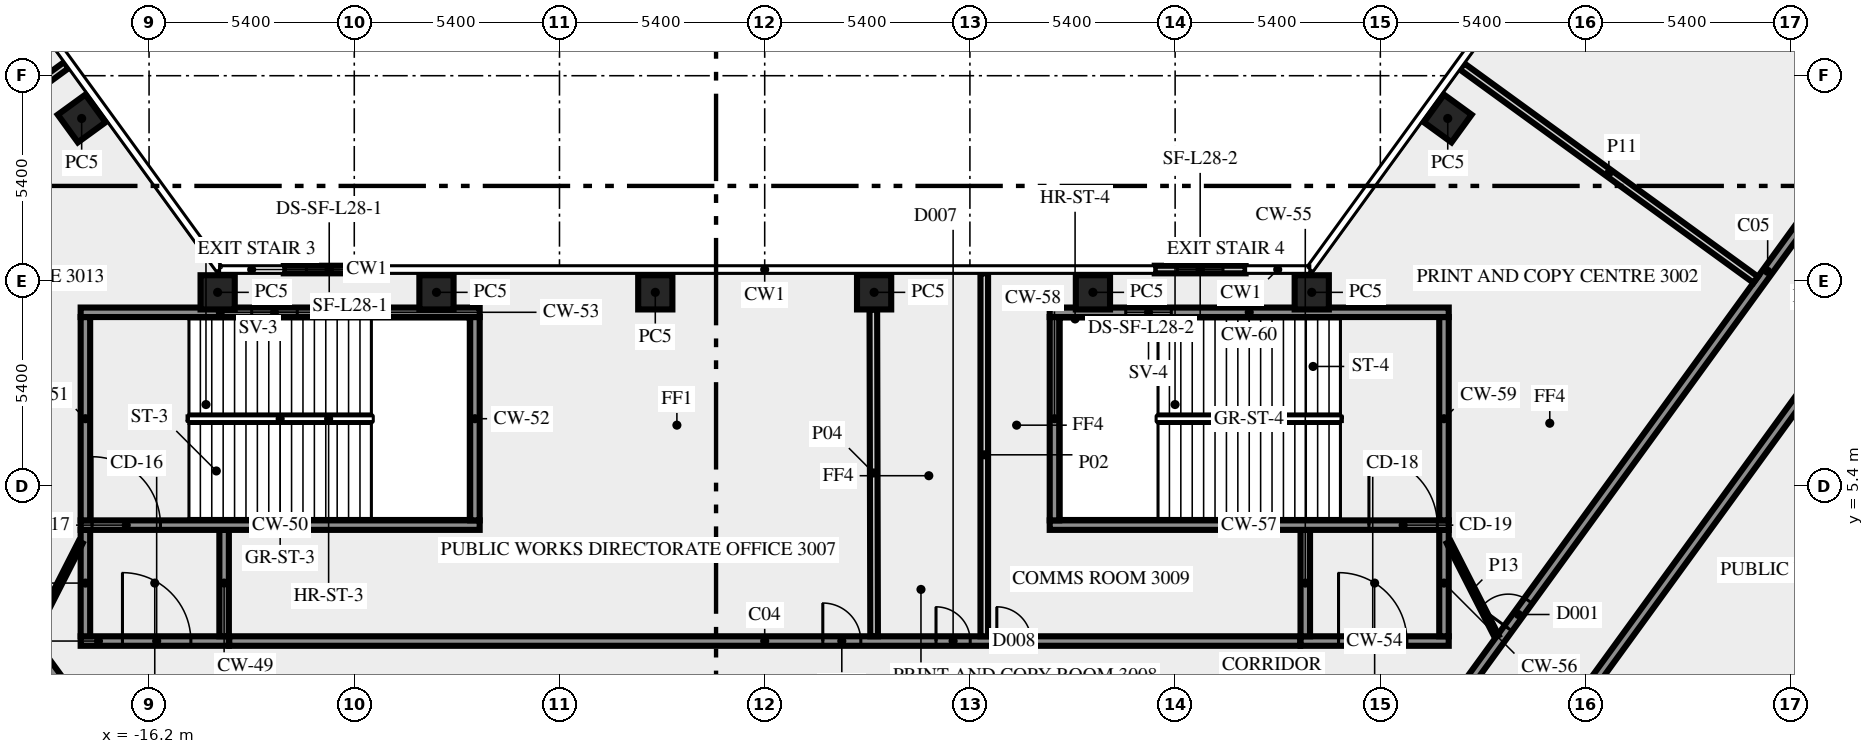
"""IFC4 building model, lengths in metres.
Left out: names, types, materials, properties, quantities, classifications, styles, units other than length and angle.
Written with IfcOpenShell. Run it as: python <this file> out.ifc"""

import sys

from ifc_helpers import new_model, si_unit, direction, frame, frame_2d, origin, origin_2d, place, context, subcontext, project, spatial, rectangle, extrude, element, fill, save


model = new_model("IFC4")
c1 = context("Model", 3, precision=1e-05, world=origin(), true_north=direction((0.0, 1.0)))
c2 = subcontext(c1, "Body", "Model", "MODEL_VIEW")
j1 = project(units=[si_unit("LENGTHUNIT", "METRE"), si_unit("PLANEANGLEUNIT", "RADIAN")], contexts=[c1])
p1 = place(None, origin())
s1 = spatial("IfcSite", under=j1, at=p1, CompositionType="ELEMENT")
p2 = place(p1, origin())
s2 = spatial("IfcBuilding", under=s1, at=p2, CompositionType="ELEMENT")
p3 = place(p2, frame((0.0, 0.0, 129.0)))
s3 = spatial("IfcBuildingStorey", under=s2, at=p3, CompositionType="ELEMENT", Elevation=129.0)
for number, where, z_axis, x_axis in (
    (1, (-17.974, 15.075, 0.0), (0.0, 0.0, 1.0), (-0.588, 0.809, 0.0)),
    (2, (17.974, 15.075, 0.0), (0.0, 0.0, 1.0), (-0.588, -0.809, 0.0)),
    (3, (14.395, 10.5, 0.0), (0.0, 0.0, 1.0), (-1.0, 0.0, 0.0)),
    (4, (8.637, 10.5, 0.0), (0.0, 0.0, 1.0), (-1.0, 0.0, 0.0)),
    (5, (2.879, 10.5, 0.0), (0.0, 0.0, 1.0), (-1.0, 0.0, 0.0)),
    (6, (-2.879, 10.5, 0.0), (0.0, 0.0, 1.0), (-1.0, 0.0, 0.0)),
    (7, (-8.637, 10.5, 0.0), (0.0, 0.0, 1.0), (-1.0, 0.0, 0.0)),
    (8, (-14.395, 10.5, 0.0), (0.0, 0.0, 1.0), (-1.0, 0.0, 0.0)),
):
    element("IfcColumn", number, at=place(p3, frame(where, z_axis=z_axis, x_axis=x_axis)), inside=s3, PredefinedType="COLUMN", context=c2, shape_type="SweptSolid", body=[
        extrude(rectangle(XDim=0.9, YDim=0.9, at=origin_2d()), origin(), (0.0, 0.0, 1.0), 3.4),
    ])
p4 = place(p3, frame((12.655, 11.1, 0.0), z_axis=(0.0, 0.0, 1.0), x_axis=(-1.0, 0.0, 0.0)))
e9 = element("IfcWall", 9, at=p4, inside=s3, PredefinedType="SOLIDWALL", context=c2, shape_type="SweptSolid", body=[
    extrude(rectangle(XDim=2.392, YDim=0.2, at=frame_2d((1.196, 0.0))), origin(), (0.0, 0.0, 1.0), 3.4),
])
p5 = place(p4, frame((0.596, 0.0, 1.0)))
e10 = element("IfcOpeningElement", 10, at=p5, cuts=e9, PredefinedType="OPENING", context=c2, shape_type="SweptSolid", body=[
    extrude(rectangle(XDim=1.2, YDim=1.2, at=frame_2d((0.6, 0.6))), frame((0.0, 0.11, 0.0), z_axis=(0.0, -1.0, 0.0), x_axis=(1.0, 0.0, 0.0)), (0.0, 0.0, 1.0), 0.22),
])
p6 = place(p3, frame((-10.263, 11.1, 0.0), z_axis=(0.0, 0.0, 1.0), x_axis=(-1.0, 0.0, 0.0)))
e11 = element("IfcWall", 11, at=p6, inside=s3, PredefinedType="SOLIDWALL", context=c2, shape_type="SweptSolid", body=[
    extrude(rectangle(XDim=2.392, YDim=0.2, at=frame_2d((1.196, 0.0))), origin(), (0.0, 0.0, 1.0), 3.4),
])
p7 = place(p6, frame((0.596, 0.0, 1.0)))
e12 = element("IfcOpeningElement", 12, at=p7, cuts=e11, PredefinedType="OPENING", context=c2, shape_type="SweptSolid", body=[
    extrude(rectangle(XDim=1.2, YDim=1.2, at=frame_2d((0.6, 0.6))), frame((0.0, 0.11, 0.0), z_axis=(0.0, -1.0, 0.0), x_axis=(1.0, 0.0, 0.0)), (0.0, 0.0, 1.0), 0.22),
])
p8 = place(p3, frame((-18.0, 1.325, 0.0), z_axis=(0.0, 0.0, 1.0), x_axis=(1.0, 0.0, 0.0)))
e13 = element("IfcWall", 13, at=p8, inside=s3, PredefinedType="SHEAR", context=c2, shape_type="SweptSolid", body=[
    extrude(rectangle(XDim=3.9, YDim=0.25, at=frame_2d((1.95, 0.0))), origin(), (0.0, 0.0, 1.0), 3.4),
])
p9 = place(p8, frame((1.1, 0.0, 0.0)))
e14 = element("IfcOpeningElement", 14, at=p9, cuts=e13, PredefinedType="OPENING", context=c2, shape_type="SweptSolid", body=[
    extrude(rectangle(XDim=1.8, YDim=2.1, at=frame_2d((0.9, 1.05))), frame((0.0, 0.135, 0.0), z_axis=(0.0, -1.0, 0.0), x_axis=(1.0, 0.0, 0.0)), (0.0, 0.0, 1.0), 0.27),
])
for number, where, z_axis, x_axis in (
    (15, (-17.875, 1.45, 0.0), (0.0, 0.0, 1.0), (0.0, 1.0, 0.0)),
    (16, (-14.225, 1.45, 0.0), (0.0, 0.0, 1.0), (0.0, 1.0, 0.0)),
):
    element("IfcWall", number, at=place(p3, frame(where, z_axis=z_axis, x_axis=x_axis)), inside=s3, PredefinedType="SHEAR", context=c2, shape_type="SweptSolid", body=[
        extrude(rectangle(XDim=2.8, YDim=0.25, at=frame_2d((1.4, 0.0))), origin(), (0.0, 0.0, 1.0), 3.4),
    ])
p10 = place(p3, frame((-18.0, 4.375, 0.0), z_axis=(0.0, 0.0, 1.0), x_axis=(1.0, 0.0, 0.0)))
e17 = element("IfcWall", 17, at=p10, inside=s3, PredefinedType="SHEAR", context=c2, shape_type="SweptSolid", body=[
    extrude(rectangle(XDim=10.5, YDim=0.25, at=frame_2d((5.25, 0.0))), origin(), (0.0, 0.0, 1.0), 3.4),
])
p11 = place(p10, frame((0.3, 0.0, 0.0)))
e18 = element("IfcOpeningElement", 18, at=p11, cuts=e17, PredefinedType="OPENING", context=c2, shape_type="SweptSolid", body=[
    extrude(rectangle(XDim=1.8, YDim=2.1, at=frame_2d((0.9, 1.05))), frame((0.0, 0.135, 0.0), z_axis=(0.0, -1.0, 0.0), x_axis=(1.0, 0.0, 0.0)), (0.0, 0.0, 1.0), 0.27),
])
for number, where, z_axis, x_axis in (
    (19, (-17.875, 4.5, 0.0), (0.0, 0.0, 1.0), (0.0, 1.0, 0.0)),
    (20, (-7.625, 4.5, 0.0), (0.0, 0.0, 1.0), (0.0, 1.0, 0.0)),
):
    element("IfcWall", number, at=place(p3, frame(where, z_axis=z_axis, x_axis=x_axis)), inside=s3, PredefinedType="SHEAR", context=c2, shape_type="SweptSolid", body=[
        extrude(rectangle(XDim=5.35, YDim=0.25, at=frame_2d((2.675, 0.0))), origin(), (0.0, 0.0, 1.0), 3.4),
    ])
p12 = place(p3, frame((-18.0, 9.975, 0.0), z_axis=(0.0, 0.0, 1.0), x_axis=(1.0, 0.0, 0.0)))
e21 = element("IfcWall", 21, at=p12, inside=s3, PredefinedType="SHEAR", context=c2, shape_type="SweptSolid", body=[
    extrude(rectangle(XDim=10.5, YDim=0.25, at=frame_2d((5.25, 0.0))), origin(), (0.0, 0.0, 1.0), 3.4),
])
p13 = place(p12, frame((4.5, 0.0, 1.0)))
e22 = element("IfcOpeningElement", 22, at=p13, cuts=e21, PredefinedType="OPENING", context=c2, shape_type="SweptSolid", body=[
    extrude(rectangle(XDim=1.2, YDim=1.2, at=frame_2d((0.6, 0.6))), frame((0.0, 0.135, 0.0), z_axis=(0.0, -1.0, 0.0), x_axis=(1.0, 0.0, 0.0)), (0.0, 0.0, 1.0), 0.27),
])
p14 = place(p3, frame((14.1, 1.325, 0.0), z_axis=(0.0, 0.0, 1.0), x_axis=(1.0, 0.0, 0.0)))
e23 = element("IfcWall", 23, at=p14, inside=s3, PredefinedType="SHEAR", context=c2, shape_type="SweptSolid", body=[
    extrude(rectangle(XDim=3.9, YDim=0.25, at=frame_2d((1.95, 0.0))), origin(), (0.0, 0.0, 1.0), 3.4),
])
p15 = place(p14, frame((1.0, 0.0, 0.0)))
e24 = element("IfcOpeningElement", 24, at=p15, cuts=e23, PredefinedType="OPENING", context=c2, shape_type="SweptSolid", body=[
    extrude(rectangle(XDim=1.8, YDim=2.1, at=frame_2d((0.9, 1.05))), frame((0.0, 0.135, 0.0), z_axis=(0.0, -1.0, 0.0), x_axis=(1.0, 0.0, 0.0)), (0.0, 0.0, 1.0), 0.27),
])
for number, where, z_axis, x_axis in (
    (25, (14.225, 1.45, 0.0), (0.0, 0.0, 1.0), (0.0, 1.0, 0.0)),
    (26, (17.875, 1.45, 0.0), (0.0, 0.0, 1.0), (0.0, 1.0, 0.0)),
):
    element("IfcWall", number, at=place(p3, frame(where, z_axis=z_axis, x_axis=x_axis)), inside=s3, PredefinedType="SHEAR", context=c2, shape_type="SweptSolid", body=[
        extrude(rectangle(XDim=2.8, YDim=0.25, at=frame_2d((1.4, 0.0))), origin(), (0.0, 0.0, 1.0), 3.4),
    ])
p16 = place(p3, frame((7.5, 4.375, 0.0), z_axis=(0.0, 0.0, 1.0), x_axis=(1.0, 0.0, 0.0)))
e27 = element("IfcWall", 27, at=p16, inside=s3, PredefinedType="SHEAR", context=c2, shape_type="SweptSolid", body=[
    extrude(rectangle(XDim=10.5, YDim=0.25, at=frame_2d((5.25, 0.0))), origin(), (0.0, 0.0, 1.0), 3.4),
])
p17 = place(p16, frame((8.4, 0.0, 0.0)))
e28 = element("IfcOpeningElement", 28, at=p17, cuts=e27, PredefinedType="OPENING", context=c2, shape_type="SweptSolid", body=[
    extrude(rectangle(XDim=1.8, YDim=2.1, at=frame_2d((0.9, 1.05))), frame((0.0, 0.135, 0.0), z_axis=(0.0, -1.0, 0.0), x_axis=(1.0, 0.0, 0.0)), (0.0, 0.0, 1.0), 0.27),
])
for number, where, z_axis, x_axis in (
    (29, (7.625, 4.5, 0.0), (0.0, 0.0, 1.0), (0.0, 1.0, 0.0)),
    (30, (17.875, 4.5, 0.0), (0.0, 0.0, 1.0), (0.0, 1.0, 0.0)),
):
    element("IfcWall", number, at=place(p3, frame(where, z_axis=z_axis, x_axis=x_axis)), inside=s3, PredefinedType="SHEAR", context=c2, shape_type="SweptSolid", body=[
        extrude(rectangle(XDim=5.35, YDim=0.25, at=frame_2d((2.675, 0.0))), origin(), (0.0, 0.0, 1.0), 3.4),
    ])
p18 = place(p3, frame((7.5, 9.975, 0.0), z_axis=(0.0, 0.0, 1.0), x_axis=(1.0, 0.0, 0.0)))
e31 = element("IfcWall", 31, at=p18, inside=s3, PredefinedType="SHEAR", context=c2, shape_type="SweptSolid", body=[
    extrude(rectangle(XDim=10.5, YDim=0.25, at=frame_2d((5.25, 0.0))), origin(), (0.0, 0.0, 1.0), 3.4),
])
p19 = place(p18, frame((2.0, 0.0, 1.0)))
e32 = element("IfcOpeningElement", 32, at=p19, cuts=e31, PredefinedType="OPENING", context=c2, shape_type="SweptSolid", body=[
    extrude(rectangle(XDim=1.2, YDim=1.2, at=frame_2d((0.6, 0.6))), frame((0.0, 0.135, 0.0), z_axis=(0.0, -1.0, 0.0), x_axis=(1.0, 0.0, 0.0)), (0.0, 0.0, 1.0), 0.27),
])
p20 = place(p3, frame((-37.232, 25.972, 0.0), z_axis=(0.0, 0.0, 1.0), x_axis=(0.587786323093, -0.809016216391, 0.0)))
e33 = element("IfcWall", 33, at=p20, inside=s3, PredefinedType="SOLIDWALL", context=c2, shape_type="SweptSolid", body=[
    extrude(rectangle(XDim=33.493, YDim=0.25, at=frame_2d((16.747, 0.0))), origin(), (0.0, 0.0, 1.0), 3.4),
])
p21 = place(p20, frame((9.785, 0.0, 0.0)))
e34 = element("IfcOpeningElement", 34, at=p21, cuts=e33, PredefinedType="OPENING", context=c2, shape_type="SweptSolid", body=[
    extrude(rectangle(XDim=1.8, YDim=2.1, at=frame_2d((0.9, 1.05))), frame((0.0, 0.135, 0.0), z_axis=(0.0, -1.0, 0.0), x_axis=(1.0, 0.0, 0.0)), (0.0, 0.0, 1.0), 0.27),
])
p22 = place(p20, frame((29.152, 0.0, 0.0)))
e35 = element("IfcOpeningElement", 35, at=p22, cuts=e33, PredefinedType="OPENING", context=c2, shape_type="SweptSolid", body=[
    extrude(rectangle(XDim=0.9, YDim=2.1, at=frame_2d((0.45, 1.05))), frame((0.0, 0.135, 0.0), z_axis=(0.0, -1.0, 0.0), x_axis=(1.0, 0.0, 0.0)), (0.0, 0.0, 1.0), 0.27),
])
p23 = place(p20, frame((1.335, 0.0, 0.0)))
e36 = element("IfcOpeningElement", 36, at=p23, cuts=e33, PredefinedType="OPENING", context=c2, shape_type="SweptSolid", body=[
    extrude(rectangle(XDim=0.9, YDim=2.1, at=frame_2d((0.45, 1.05))), frame((0.0, 0.135, 0.0), z_axis=(0.0, -1.0, 0.0), x_axis=(1.0, 0.0, 0.0)), (0.0, 0.0, 1.0), 0.27),
])
p24 = place(p3, frame((-14.09, 1.325, 0.0), z_axis=(0.0, 0.0, 1.0), x_axis=(1.0, 0.0, 0.0)))
e37 = element("IfcWall", 37, at=p24, inside=s3, PredefinedType="SOLIDWALL", context=c2, shape_type="SweptSolid", body=[
    extrude(rectangle(XDim=28.18, YDim=0.25, at=frame_2d((14.09, 0.0))), origin(), (0.0, 0.0, 1.0), 3.4),
])
p25 = place(p24, frame((20.198, 0.0, 0.0)))
e38 = element("IfcOpeningElement", 38, at=p25, cuts=e37, PredefinedType="OPENING", context=c2, shape_type="SweptSolid", body=[
    extrude(rectangle(XDim=0.9, YDim=2.1, at=frame_2d((0.45, 1.05))), frame((0.0, 0.135, 0.0), z_axis=(0.0, -1.0, 0.0), x_axis=(1.0, 0.0, 0.0)), (0.0, 0.0, 1.0), 0.27),
])
p26 = place(p24, frame((15.619, 0.0, 0.0)))
e39 = element("IfcOpeningElement", 39, at=p26, cuts=e37, PredefinedType="OPENING", context=c2, shape_type="SweptSolid", body=[
    extrude(rectangle(XDim=1.0, YDim=2.1, at=frame_2d((0.5, 1.05))), frame((0.0, 0.135, 0.0), z_axis=(0.0, -1.0, 0.0), x_axis=(1.0, 0.0, 0.0)), (0.0, 0.0, 1.0), 0.27),
])
p27 = place(p24, frame((18.598, 0.0, 0.0)))
e40 = element("IfcOpeningElement", 40, at=p27, cuts=e37, PredefinedType="OPENING", context=c2, shape_type="SweptSolid", body=[
    extrude(rectangle(XDim=0.9, YDim=2.1, at=frame_2d((0.45, 1.05))), frame((0.0, 0.135, 0.0), z_axis=(0.0, -1.0, 0.0), x_axis=(1.0, 0.0, 0.0)), (0.0, 0.0, 1.0), 0.27),
])
p28 = place(p3, frame((17.545, -1.125, 0.0), z_axis=(0.0, 0.0, 1.0), x_axis=(0.587786330937, 0.809016210693, 0.0)))
e41 = element("IfcWall", 41, at=p28, inside=s3, PredefinedType="SOLIDWALL", context=c2, shape_type="SweptSolid", body=[
    extrude(rectangle(XDim=30.103, YDim=0.25, at=frame_2d((15.052, 0.0))), origin(), (0.0, 0.0, 1.0), 3.4),
])
p29 = place(p28, frame((3.441, 0.0, 0.0)))
e42 = element("IfcOpeningElement", 42, at=p29, cuts=e41, PredefinedType="OPENING", context=c2, shape_type="SweptSolid", body=[
    extrude(rectangle(XDim=0.9, YDim=2.1, at=frame_2d((0.45, 1.05))), frame((0.0, 0.135, 0.0), z_axis=(0.0, -1.0, 0.0), x_axis=(1.0, 0.0, 0.0)), (0.0, 0.0, 1.0), 0.27),
])
p30 = place(p28, frame((28.729, 0.0, 0.0)))
e43 = element("IfcOpeningElement", 43, at=p30, cuts=e41, PredefinedType="OPENING", context=c2, shape_type="SweptSolid", body=[
    extrude(rectangle(XDim=0.9, YDim=2.1, at=frame_2d((0.45, 1.05))), frame((0.0, 0.135, 0.0), z_axis=(0.0, -1.0, 0.0), x_axis=(1.0, 0.0, 0.0)), (0.0, 0.0, 1.0), 0.27),
])
p31 = place(p3, frame((37.236, 21.469, 0.0), z_axis=(0.0, 0.0, 1.0), x_axis=(-0.58778344073, -0.809018310549, 0.0)))
e44 = element("IfcWall", 44, at=p31, inside=s3, PredefinedType="SOLIDWALL", context=c2, shape_type="SweptSolid", body=[
    extrude(rectangle(XDim=28.42, YDim=0.25, at=frame_2d((14.21, 0.0))), origin(), (0.0, 0.0, 1.0), 3.4),
])
p32 = place(p31, frame((13.205, 0.0, 0.0)))
e45 = element("IfcOpeningElement", 45, at=p32, cuts=e44, PredefinedType="OPENING", context=c2, shape_type="SweptSolid", body=[
    extrude(rectangle(XDim=1.0, YDim=2.1, at=frame_2d((0.5, 1.05))), frame((0.0, 0.135, 0.0), z_axis=(0.0, -1.0, 0.0), x_axis=(1.0, 0.0, 0.0)), (0.0, 0.0, 1.0), 0.27),
])
p33 = place(p31, frame((0.224, 0.0, 0.0)))
e46 = element("IfcOpeningElement", 46, at=p33, cuts=e44, PredefinedType="OPENING", context=c2, shape_type="SweptSolid", body=[
    extrude(rectangle(XDim=0.9, YDim=2.1, at=frame_2d((0.45, 1.05))), frame((0.0, 0.135, 0.0), z_axis=(0.0, -1.0, 0.0), x_axis=(1.0, 0.0, 0.0)), (0.0, 0.0, 1.0), 0.27),
])
p34 = place(p3, frame((5.778, 11.0, 0.0), z_axis=(0.0, 0.0, 1.0), x_axis=(0.0, -1.0, 0.0)))
e47 = element("IfcWall", 47, at=p34, inside=s3, PredefinedType="SOLIDWALL", context=c2, shape_type="SweptSolid", body=[
    extrude(rectangle(XDim=9.55, YDim=0.2, at=frame_2d((4.775, 0.0))), origin(), (0.0, 0.0, 1.0), 2.5),
])
p35 = place(p3, frame((2.879, 1.45, 0.0), z_axis=(0.0, 0.0, 1.0), x_axis=(-0.002357613104, 0.999997220826, 0.0)))
e48 = element("IfcWall", 48, at=p35, inside=s3, PredefinedType="SOLIDWALL", context=c2, shape_type="SweptSolid", body=[
    extrude(rectangle(XDim=8.595, YDim=0.2, at=frame_2d((4.297, 0.0))), origin(), (0.0, 0.0, 1.0), 3.4),
])
p36 = place(p3, frame((-26.089, 10.848, 0.0), z_axis=(0.0, 0.0, 1.0), x_axis=(0.807661302092, 0.589646691759, 0.0)))
e49 = element("IfcWall", 49, at=p36, inside=s3, PredefinedType="SOLIDWALL", context=c2, shape_type="SweptSolid", body=[
    extrude(rectangle(XDim=9.55, YDim=0.2, at=frame_2d((4.775, 0.0))), origin(), (0.0, 0.0, 1.0), 2.5),
])
p37 = place(p3, frame((26.077, 10.832, 0.0), z_axis=(0.0, 0.0, 1.0), x_axis=(-0.809052142986, 0.587736871338, 0.0)))
e50 = element("IfcWall", 50, at=p37, inside=s3, PredefinedType="SOLIDWALL", context=c2, shape_type="SweptSolid", body=[
    extrude(rectangle(XDim=9.55, YDim=0.2, at=frame_2d((4.775, 0.0))), origin(), (0.0, 0.0, 1.0), 2.5),
])
for number, where, z_axis, x_axis in (
    (51, (18.0, 3.925, 0.0), (0.0, 0.0, 1.0), (0.454, -0.891, 0.0)),
    (52, (-19.261, 1.45, 0.0), (0.0, 0.0, 1.0), (0.454, 0.891, 0.0)),
):
    element("IfcWall", number, at=place(p3, frame(where, z_axis=z_axis, x_axis=x_axis)), inside=s3, PredefinedType="PARTITIONING", context=c2, shape_type="SweptSolid", body=[
        extrude(rectangle(XDim=2.778, YDim=0.12, at=frame_2d((1.389, 0.0))), origin(), (0.0, 0.0, 1.0), 3.4),
    ])
p38 = place(p5, origin())
e53 = element("IfcWindow", 53, at=p38, inside=s3, PartitioningType="SINGLE_PANEL", PredefinedType="WINDOW", context=c2, shape_type="SweptSolid", body=[
    extrude(rectangle(XDim=1.2, YDim=1.2, at=frame_2d((0.6, 0.6))), frame((0.0, 0.03, 0.0), z_axis=(0.0, -1.0, 0.0), x_axis=(1.0, 0.0, 0.0)), (0.0, 0.0, 1.0), 0.06),
])
fill(e10, e53)
p39 = place(p7, origin())
e54 = element("IfcWindow", 54, at=p39, inside=s3, PartitioningType="SINGLE_PANEL", PredefinedType="WINDOW", context=c2, shape_type="SweptSolid", body=[
    extrude(rectangle(XDim=1.2, YDim=1.2, at=frame_2d((0.6, 0.6))), frame((0.0, 0.03, 0.0), z_axis=(0.0, -1.0, 0.0), x_axis=(1.0, 0.0, 0.0)), (0.0, 0.0, 1.0), 0.06),
])
fill(e12, e54)
p40 = place(p9, origin())
e55 = element("IfcDoor", 55, at=p40, inside=s3, OperationType="DOUBLE_DOOR_SINGLE_SWING", PredefinedType="DOOR", context=c2, shape_type="SweptSolid", body=[
    extrude(rectangle(XDim=1.8, YDim=2.1, at=frame_2d((0.9, 1.05))), frame((0.0, 0.025, 0.0), z_axis=(0.0, -1.0, 0.0), x_axis=(1.0, 0.0, 0.0)), (0.0, 0.0, 1.0), 0.05),
])
fill(e14, e55)
p41 = place(p11, origin())
e56 = element("IfcDoor", 56, at=p41, inside=s3, OperationType="DOUBLE_DOOR_SINGLE_SWING", PredefinedType="DOOR", context=c2, shape_type="SweptSolid", body=[
    extrude(rectangle(XDim=1.8, YDim=2.1, at=frame_2d((0.9, 1.05))), frame((0.0, 0.025, 0.0), z_axis=(0.0, -1.0, 0.0), x_axis=(1.0, 0.0, 0.0)), (0.0, 0.0, 1.0), 0.05),
])
fill(e18, e56)
p42 = place(p13, origin())
e57 = element("IfcWindow", 57, at=p42, inside=s3, PartitioningType="SINGLE_PANEL", PredefinedType="WINDOW", context=c2, shape_type="SweptSolid", body=[
    extrude(rectangle(XDim=1.2, YDim=1.2, at=frame_2d((0.6, 0.6))), frame((0.0, 0.03, 0.0), z_axis=(0.0, -1.0, 0.0), x_axis=(1.0, 0.0, 0.0)), (0.0, 0.0, 1.0), 0.06),
])
fill(e22, e57)
p43 = place(p15, origin())
e58 = element("IfcDoor", 58, at=p43, inside=s3, OperationType="DOUBLE_DOOR_SINGLE_SWING", PredefinedType="DOOR", context=c2, shape_type="SweptSolid", body=[
    extrude(rectangle(XDim=1.8, YDim=2.1, at=frame_2d((0.9, 1.05))), frame((0.0, 0.025, 0.0), z_axis=(0.0, -1.0, 0.0), x_axis=(1.0, 0.0, 0.0)), (0.0, 0.0, 1.0), 0.05),
])
fill(e24, e58)
p44 = place(p17, origin())
e59 = element("IfcDoor", 59, at=p44, inside=s3, OperationType="DOUBLE_DOOR_SINGLE_SWING", PredefinedType="DOOR", context=c2, shape_type="SweptSolid", body=[
    extrude(rectangle(XDim=1.8, YDim=2.1, at=frame_2d((0.9, 1.05))), frame((0.0, 0.025, 0.0), z_axis=(0.0, -1.0, 0.0), x_axis=(1.0, 0.0, 0.0)), (0.0, 0.0, 1.0), 0.05),
])
fill(e28, e59)
p45 = place(p19, origin())
e60 = element("IfcWindow", 60, at=p45, inside=s3, PartitioningType="SINGLE_PANEL", PredefinedType="WINDOW", context=c2, shape_type="SweptSolid", body=[
    extrude(rectangle(XDim=1.2, YDim=1.2, at=frame_2d((0.6, 0.6))), frame((0.0, 0.03, 0.0), z_axis=(0.0, -1.0, 0.0), x_axis=(1.0, 0.0, 0.0)), (0.0, 0.0, 1.0), 0.06),
])
fill(e32, e60)
p46 = place(p25, origin())
e61 = element("IfcDoor", 61, at=p46, inside=s3, OperationType="SINGLE_SWING_LEFT", PredefinedType="DOOR", context=c2, shape_type="SweptSolid", body=[
    extrude(rectangle(XDim=0.9, YDim=2.1, at=frame_2d((0.45, 1.05))), frame((0.0, 0.025, 0.0), z_axis=(0.0, -1.0, 0.0), x_axis=(1.0, 0.0, 0.0)), (0.0, 0.0, 1.0), 0.05),
])
fill(e38, e61)
p47 = place(p26, origin())
e62 = element("IfcDoor", 62, at=p47, inside=s3, OperationType="SINGLE_SWING_RIGHT", PredefinedType="DOOR", context=c2, shape_type="SweptSolid", body=[
    extrude(rectangle(XDim=1.0, YDim=2.1, at=frame_2d((0.5, 1.05))), frame((0.0, 0.025, 0.0), z_axis=(0.0, -1.0, 0.0), x_axis=(1.0, 0.0, 0.0)), (0.0, 0.0, 1.0), 0.05),
])
fill(e39, e62)
p48 = place(p29, origin())
e63 = element("IfcDoor", 63, at=p48, inside=s3, OperationType="SINGLE_SWING_LEFT", PredefinedType="DOOR", context=c2, shape_type="SweptSolid", body=[
    extrude(rectangle(XDim=0.9, YDim=2.1, at=frame_2d((0.45, 1.05))), frame((0.0, 0.025, 0.0), z_axis=(0.0, -1.0, 0.0), x_axis=(1.0, 0.0, 0.0)), (0.0, 0.0, 1.0), 0.05),
])
fill(e42, e63)
p49 = place(p27, origin())
e64 = element("IfcDoor", 64, at=p49, inside=s3, OperationType="SINGLE_SWING_RIGHT", PredefinedType="DOOR", context=c2, shape_type="SweptSolid", body=[
    extrude(rectangle(XDim=0.9, YDim=2.1, at=frame_2d((0.45, 1.05))), frame((0.0, 0.025, 0.0), z_axis=(0.0, -1.0, 0.0), x_axis=(1.0, 0.0, 0.0)), (0.0, 0.0, 1.0), 0.05),
])
fill(e40, e64)
save(model, sys.argv[1])
